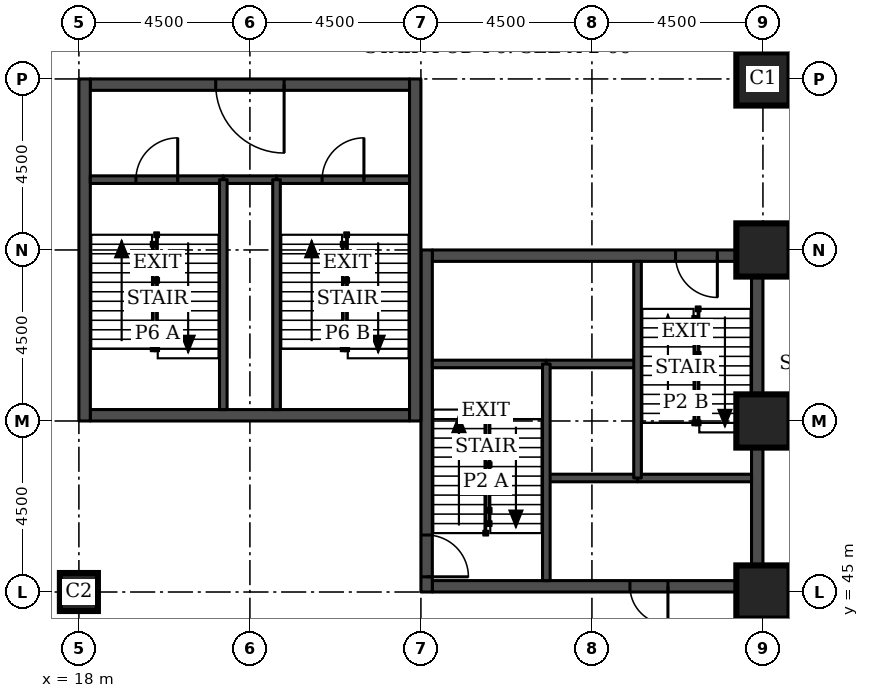
"""IFC4 building model, lengths in metres.
Left out: names, types, materials, properties, quantities, classifications, styles, units other than length and angle.
Written with IfcOpenShell. Run it as: python <this file> out.ifc"""

import sys

from ifc_helpers import new_model, si_unit, direction, frame, frame_2d, origin, origin_2d, place, context, subcontext, project, spatial, rectangle, extrude, element, fill, save


model = new_model("IFC4")
c1 = context("Model", 3, precision=1e-05, world=origin(), true_north=direction((0.0, 1.0)))
c2 = subcontext(c1, "Body", "Model", "MODEL_VIEW")
j1 = project(units=[si_unit("LENGTHUNIT", "METRE"), si_unit("PLANEANGLEUNIT", "RADIAN")], contexts=[c1])
p1 = place(None, origin())
s1 = spatial("IfcSite", under=j1, at=p1, CompositionType="ELEMENT")
p2 = place(p1, origin())
s2 = spatial("IfcBuilding", under=s1, at=p2, CompositionType="ELEMENT")
p3 = place(p2, frame((0.0, 0.0, -9.0)))
s3 = spatial("IfcBuildingStorey", under=s2, at=p3, CompositionType="ELEMENT", Elevation=-9.0)
for number, where, z_axis, x_axis in (
    (1, (36.0, 45.0, 0.0), (0.0, 0.0, 1.0), (1.0, 0.0, 0.0)),
    (2, (36.0, 49.5, 0.0), (0.0, 0.0, 1.0), (1.0, 0.0, 0.0)),
    (3, (36.0, 54.0, 0.0), (0.0, 0.0, 1.0), (1.0, 0.0, 0.0)),
    (4, (36.0, 58.5, 0.0), (0.0, 0.0, 1.0), (1.0, 0.0, 0.0)),
):
    element("IfcColumn", number, at=place(p3, frame(where, z_axis=z_axis, x_axis=x_axis)), inside=s3, PredefinedType="COLUMN", context=c2, shape_type="SweptSolid", body=[
        extrude(rectangle(XDim=1.4, YDim=1.4, at=origin_2d()), origin(), (0.0, 0.0, 1.0), 4.5),
    ])
p4 = place(p3, frame((18.0, 45.0, 0.0), z_axis=(0.0, 0.0, 1.0), x_axis=(1.0, 0.0, 0.0)))
e5 = element("IfcColumn", 5, at=p4, inside=s3, PredefinedType="COLUMN", context=c2, shape_type="SweptSolid", body=[
    extrude(rectangle(XDim=1.0, YDim=1.0, at=origin_2d()), origin(), (0.0, 0.0, 1.0), 4.5),
])
p5 = place(p3, frame((27.3, 45.15, 0.0), z_axis=(0.0, 0.0, 1.0), x_axis=(1.0, 0.0, 0.0)))
e6 = element("IfcWall", 6, at=p5, inside=s3, PredefinedType="SHEAR", context=c2, shape_type="SweptSolid", body=[
    extrude(rectangle(XDim=8.4, YDim=0.3, at=frame_2d((4.2, 0.0))), origin(), (0.0, 0.0, 1.0), 4.5),
])
p6 = place(p5, frame((5.2, 0.0, 0.0)))
e7 = element("IfcOpeningElement", 7, at=p6, cuts=e6, PredefinedType="OPENING", context=c2, shape_type="SweptSolid", body=[
    extrude(rectangle(XDim=1.0, YDim=2.1, at=frame_2d((0.5, 1.05))), frame((0.0, 0.16, 0.0), z_axis=(0.0, -1.0, 0.0), x_axis=(1.0, 0.0, 0.0)), (0.0, 0.0, 1.0), 0.32),
])
p7 = place(p3, frame((27.3, 53.85, 0.0), z_axis=(0.0, 0.0, 1.0), x_axis=(1.0, 0.0, 0.0)))
e8 = element("IfcWall", 8, at=p7, inside=s3, PredefinedType="SHEAR", context=c2, shape_type="SweptSolid", body=[
    extrude(rectangle(XDim=8.4, YDim=0.3, at=frame_2d((4.2, 0.0))), origin(), (0.0, 0.0, 1.0), 4.5),
])
p8 = place(p7, frame((6.4, 0.0, 0.0)))
e9 = element("IfcOpeningElement", 9, at=p8, cuts=e8, PredefinedType="OPENING", context=c2, shape_type="SweptSolid", body=[
    extrude(rectangle(XDim=1.1, YDim=2.1, at=frame_2d((0.55, 1.05))), frame((0.0, 0.16, 0.0), z_axis=(0.0, -1.0, 0.0), x_axis=(1.0, 0.0, 0.0)), (0.0, 0.0, 1.0), 0.32),
])
p9 = place(p3, frame((27.15, 45.0, 0.0), z_axis=(0.0, 0.0, 1.0), x_axis=(0.0, 1.0, 0.0)))
e10 = element("IfcWall", 10, at=p9, inside=s3, PredefinedType="SHEAR", context=c2, shape_type="SweptSolid", body=[
    extrude(rectangle(XDim=9.0, YDim=0.3, at=frame_2d((4.5, 0.0))), origin(), (0.0, 0.0, 1.0), 4.5),
])
p10 = place(p9, frame((0.4, 0.0, 0.0)))
e11 = element("IfcOpeningElement", 11, at=p10, cuts=e10, PredefinedType="OPENING", context=c2, shape_type="SweptSolid", body=[
    extrude(rectangle(XDim=1.1, YDim=2.1, at=frame_2d((0.55, 1.05))), frame((0.0, 0.16, 0.0), z_axis=(0.0, -1.0, 0.0), x_axis=(1.0, 0.0, 0.0)), (0.0, 0.0, 1.0), 0.32),
])
p11 = place(p3, frame((35.85, 45.0, 0.0), z_axis=(0.0, 0.0, 1.0), x_axis=(0.0, 1.0, 0.0)))
e12 = element("IfcWall", 12, at=p11, inside=s3, PredefinedType="SHEAR", context=c2, shape_type="SweptSolid", body=[
    extrude(rectangle(XDim=9.0, YDim=0.3, at=frame_2d((4.5, 0.0))), origin(), (0.0, 0.0, 1.0), 4.5),
])
p12 = place(p3, frame((18.3, 49.65, 0.0), z_axis=(0.0, 0.0, 1.0), x_axis=(1.0, 0.0, 0.0)))
e13 = element("IfcWall", 13, at=p12, inside=s3, PredefinedType="SHEAR", context=c2, shape_type="SweptSolid", body=[
    extrude(rectangle(XDim=8.4, YDim=0.3, at=frame_2d((4.2, 0.0))), origin(), (0.0, 0.0, 1.0), 4.5),
])
p13 = place(p3, frame((18.3, 58.35, 0.0), z_axis=(0.0, 0.0, 1.0), x_axis=(1.0, 0.0, 0.0)))
e14 = element("IfcWall", 14, at=p13, inside=s3, PredefinedType="SHEAR", context=c2, shape_type="SweptSolid", body=[
    extrude(rectangle(XDim=8.4, YDim=0.3, at=frame_2d((4.2, 0.0))), origin(), (0.0, 0.0, 1.0), 4.5),
])
p14 = place(p13, frame((3.3, 0.0, 0.0)))
e15 = element("IfcOpeningElement", 15, at=p14, cuts=e14, PredefinedType="OPENING", context=c2, shape_type="SweptSolid", body=[
    extrude(rectangle(XDim=1.8, YDim=2.1, at=frame_2d((0.9, 1.05))), frame((0.0, 0.16, 0.0), z_axis=(0.0, -1.0, 0.0), x_axis=(1.0, 0.0, 0.0)), (0.0, 0.0, 1.0), 0.32),
])
for number, where, z_axis, x_axis in (
    (16, (18.15, 49.5, 0.0), (0.0, 0.0, 1.0), (0.0, 1.0, 0.0)),
    (17, (26.85, 49.5, 0.0), (0.0, 0.0, 1.0), (0.0, 1.0, 0.0)),
):
    element("IfcWall", number, at=place(p3, frame(where, z_axis=z_axis, x_axis=x_axis)), inside=s3, PredefinedType="SHEAR", context=c2, shape_type="SweptSolid", body=[
        extrude(rectangle(XDim=9.0, YDim=0.3, at=frame_2d((4.5, 0.0))), origin(), (0.0, 0.0, 1.0), 4.5),
    ])
p15 = place(p3, frame((30.3, 48.0, 0.0), z_axis=(0.0, 0.0, 1.0), x_axis=(1.0, 0.0, 0.0)))
e18 = element("IfcWall", 18, at=p15, inside=s3, PredefinedType="SOLIDWALL", context=c2, shape_type="SweptSolid", body=[
    extrude(rectangle(XDim=2.4, YDim=0.2, at=frame_2d((1.2, 0.0))), origin(), (0.0, 0.0, 1.0), 4.1),
])
p16 = place(p3, frame((32.7, 48.0, 0.0), z_axis=(0.0, 0.0, 1.0), x_axis=(1.0, 0.0, 0.0)))
e19 = element("IfcWall", 19, at=p16, inside=s3, PredefinedType="SOLIDWALL", context=c2, shape_type="SweptSolid", body=[
    extrude(rectangle(XDim=3.0, YDim=0.2, at=frame_2d((1.5, 0.0))), origin(), (0.0, 0.0, 1.0), 4.1),
])
p17 = place(p3, frame((30.3, 51.0, 0.0), z_axis=(0.0, 0.0, 1.0), x_axis=(1.0, 0.0, 0.0)))
e20 = element("IfcWall", 20, at=p17, inside=s3, PredefinedType="SOLIDWALL", context=c2, shape_type="SweptSolid", body=[
    extrude(rectangle(XDim=2.4, YDim=0.2, at=frame_2d((1.2, 0.0))), origin(), (0.0, 0.0, 1.0), 4.5),
])
p18 = place(p3, frame((27.3, 51.0, 0.0), z_axis=(0.0, 0.0, 1.0), x_axis=(1.0, 0.0, 0.0)))
e21 = element("IfcWall", 21, at=p18, inside=s3, PredefinedType="SOLIDWALL", context=c2, shape_type="SweptSolid", body=[
    extrude(rectangle(XDim=3.0, YDim=0.2, at=frame_2d((1.5, 0.0))), origin(), (0.0, 0.0, 1.0), 4.1),
])
for number, where, z_axis, x_axis in (
    (22, (30.3, 45.3, 0.0), (0.0, 0.0, 1.0), (0.0, 1.0, 0.0)),
    (23, (32.7, 48.0, 0.0), (0.0, 0.0, 1.0), (0.0, 1.0, 0.0)),
):
    element("IfcWall", number, at=place(p3, frame(where, z_axis=z_axis, x_axis=x_axis)), inside=s3, PredefinedType="SOLIDWALL", context=c2, shape_type="SweptSolid", body=[
        extrude(rectangle(XDim=5.7, YDim=0.2, at=frame_2d((2.85, 0.0))), origin(), (0.0, 0.0, 1.0), 4.1),
    ])
p19 = place(p3, frame((21.8, 55.85, 0.0), z_axis=(0.0, 0.0, 1.0), x_axis=(1.0, 0.0, 0.0)))
e24 = element("IfcWall", 24, at=p19, inside=s3, PredefinedType="SOLIDWALL", context=c2, shape_type="SweptSolid", body=[
    extrude(rectangle(XDim=1.4, YDim=0.2, at=frame_2d((0.7, 0.0))), origin(), (0.0, 0.0, 1.0), 4.1),
])
p20 = place(p3, frame((18.3, 55.85, 0.0), z_axis=(0.0, 0.0, 1.0), x_axis=(1.0, 0.0, 0.0)))
e25 = element("IfcWall", 25, at=p20, inside=s3, PredefinedType="SOLIDWALL", context=c2, shape_type="SweptSolid", body=[
    extrude(rectangle(XDim=3.5, YDim=0.2, at=frame_2d((1.75, 0.0))), origin(), (0.0, 0.0, 1.0), 4.1),
])
p21 = place(p20, frame((1.2, 0.0, 0.0)))
e26 = element("IfcOpeningElement", 26, at=p21, cuts=e25, PredefinedType="OPENING", context=c2, shape_type="SweptSolid", body=[
    extrude(rectangle(XDim=1.1, YDim=2.1, at=frame_2d((0.55, 1.05))), frame((0.0, 0.11, 0.0), z_axis=(0.0, -1.0, 0.0), x_axis=(1.0, 0.0, 0.0)), (0.0, 0.0, 1.0), 0.22),
])
p22 = place(p3, frame((23.2, 55.85, 0.0), z_axis=(0.0, 0.0, 1.0), x_axis=(1.0, 0.0, 0.0)))
e27 = element("IfcWall", 27, at=p22, inside=s3, PredefinedType="SOLIDWALL", context=c2, shape_type="SweptSolid", body=[
    extrude(rectangle(XDim=3.5, YDim=0.2, at=frame_2d((1.75, 0.0))), origin(), (0.0, 0.0, 1.0), 4.1),
])
p23 = place(p22, frame((1.2, 0.0, 0.0)))
e28 = element("IfcOpeningElement", 28, at=p23, cuts=e27, PredefinedType="OPENING", context=c2, shape_type="SweptSolid", body=[
    extrude(rectangle(XDim=1.1, YDim=2.1, at=frame_2d((0.55, 1.05))), frame((0.0, 0.11, 0.0), z_axis=(0.0, -1.0, 0.0), x_axis=(1.0, 0.0, 0.0)), (0.0, 0.0, 1.0), 0.22),
])
for number, where, z_axis, x_axis in (
    (29, (21.8, 49.8, 0.0), (0.0, 0.0, 1.0), (0.0, 1.0, 0.0)),
    (30, (23.2, 49.8, 0.0), (0.0, 0.0, 1.0), (0.0, 1.0, 0.0)),
):
    element("IfcWall", number, at=place(p3, frame(where, z_axis=z_axis, x_axis=x_axis)), inside=s3, PredefinedType="SOLIDWALL", context=c2, shape_type="SweptSolid", body=[
        extrude(rectangle(XDim=6.05, YDim=0.2, at=frame_2d((3.025, 0.0))), origin(), (0.0, 0.0, 1.0), 4.1),
    ])
p24 = place(p10, frame((1.1, 0.0, 0.0), z_axis=(0.0, 0.0, 1.0), x_axis=(-1.0, 0.0, 0.0)))
e31 = element("IfcDoor", 31, at=p24, inside=s3, OperationType="SINGLE_SWING_RIGHT", PredefinedType="DOOR", context=c2, shape_type="SweptSolid", body=[
    extrude(rectangle(XDim=1.1, YDim=2.1, at=frame_2d((0.55, 1.05))), frame((0.0, 0.025, 0.0), z_axis=(0.0, -1.0, 0.0), x_axis=(1.0, 0.0, 0.0)), (0.0, 0.0, 1.0), 0.05),
])
fill(e11, e31)
p25 = place(p8, frame((1.1, 0.0, 0.0), z_axis=(0.0, 0.0, 1.0), x_axis=(-1.0, 0.0, 0.0)))
e32 = element("IfcDoor", 32, at=p25, inside=s3, OperationType="SINGLE_SWING_LEFT", PredefinedType="DOOR", context=c2, shape_type="SweptSolid", body=[
    extrude(rectangle(XDim=1.1, YDim=2.1, at=frame_2d((0.55, 1.05))), frame((0.0, 0.025, 0.0), z_axis=(0.0, -1.0, 0.0), x_axis=(1.0, 0.0, 0.0)), (0.0, 0.0, 1.0), 0.05),
])
fill(e9, e32)
p26 = place(p6, frame((1.0, 0.0, 0.0), z_axis=(0.0, 0.0, 1.0), x_axis=(-1.0, 0.0, 0.0)))
e33 = element("IfcDoor", 33, at=p26, inside=s3, OperationType="SINGLE_SWING_LEFT", PredefinedType="DOOR", context=c2, shape_type="SweptSolid", body=[
    extrude(rectangle(XDim=1.0, YDim=2.1, at=frame_2d((0.5, 1.05))), frame((0.0, 0.025, 0.0), z_axis=(0.0, -1.0, 0.0), x_axis=(1.0, 0.0, 0.0)), (0.0, 0.0, 1.0), 0.05),
])
fill(e7, e33)
p27 = place(p21, origin())
e34 = element("IfcDoor", 34, at=p27, inside=s3, OperationType="SINGLE_SWING_RIGHT", PredefinedType="DOOR", context=c2, shape_type="SweptSolid", body=[
    extrude(rectangle(XDim=1.1, YDim=2.1, at=frame_2d((0.55, 1.05))), frame((0.0, 0.025, 0.0), z_axis=(0.0, -1.0, 0.0), x_axis=(1.0, 0.0, 0.0)), (0.0, 0.0, 1.0), 0.05),
])
fill(e26, e34)
p28 = place(p23, origin())
e35 = element("IfcDoor", 35, at=p28, inside=s3, OperationType="SINGLE_SWING_RIGHT", PredefinedType="DOOR", context=c2, shape_type="SweptSolid", body=[
    extrude(rectangle(XDim=1.1, YDim=2.1, at=frame_2d((0.55, 1.05))), frame((0.0, 0.025, 0.0), z_axis=(0.0, -1.0, 0.0), x_axis=(1.0, 0.0, 0.0)), (0.0, 0.0, 1.0), 0.05),
])
fill(e28, e35)
p29 = place(p14, frame((1.8, 0.0, 0.0), z_axis=(0.0, 0.0, 1.0), x_axis=(-1.0, 0.0, 0.0)))
e36 = element("IfcDoor", 36, at=p29, inside=s3, OperationType="SINGLE_SWING_LEFT", PredefinedType="DOOR", context=c2, shape_type="SweptSolid", body=[
    extrude(rectangle(XDim=1.8, YDim=2.1, at=frame_2d((0.9, 1.05))), frame((0.0, 0.025, 0.0), z_axis=(0.0, -1.0, 0.0), x_axis=(1.0, 0.0, 0.0)), (0.0, 0.0, 1.0), 0.05),
])
fill(e15, e36)
save(model, sys.argv[1])
